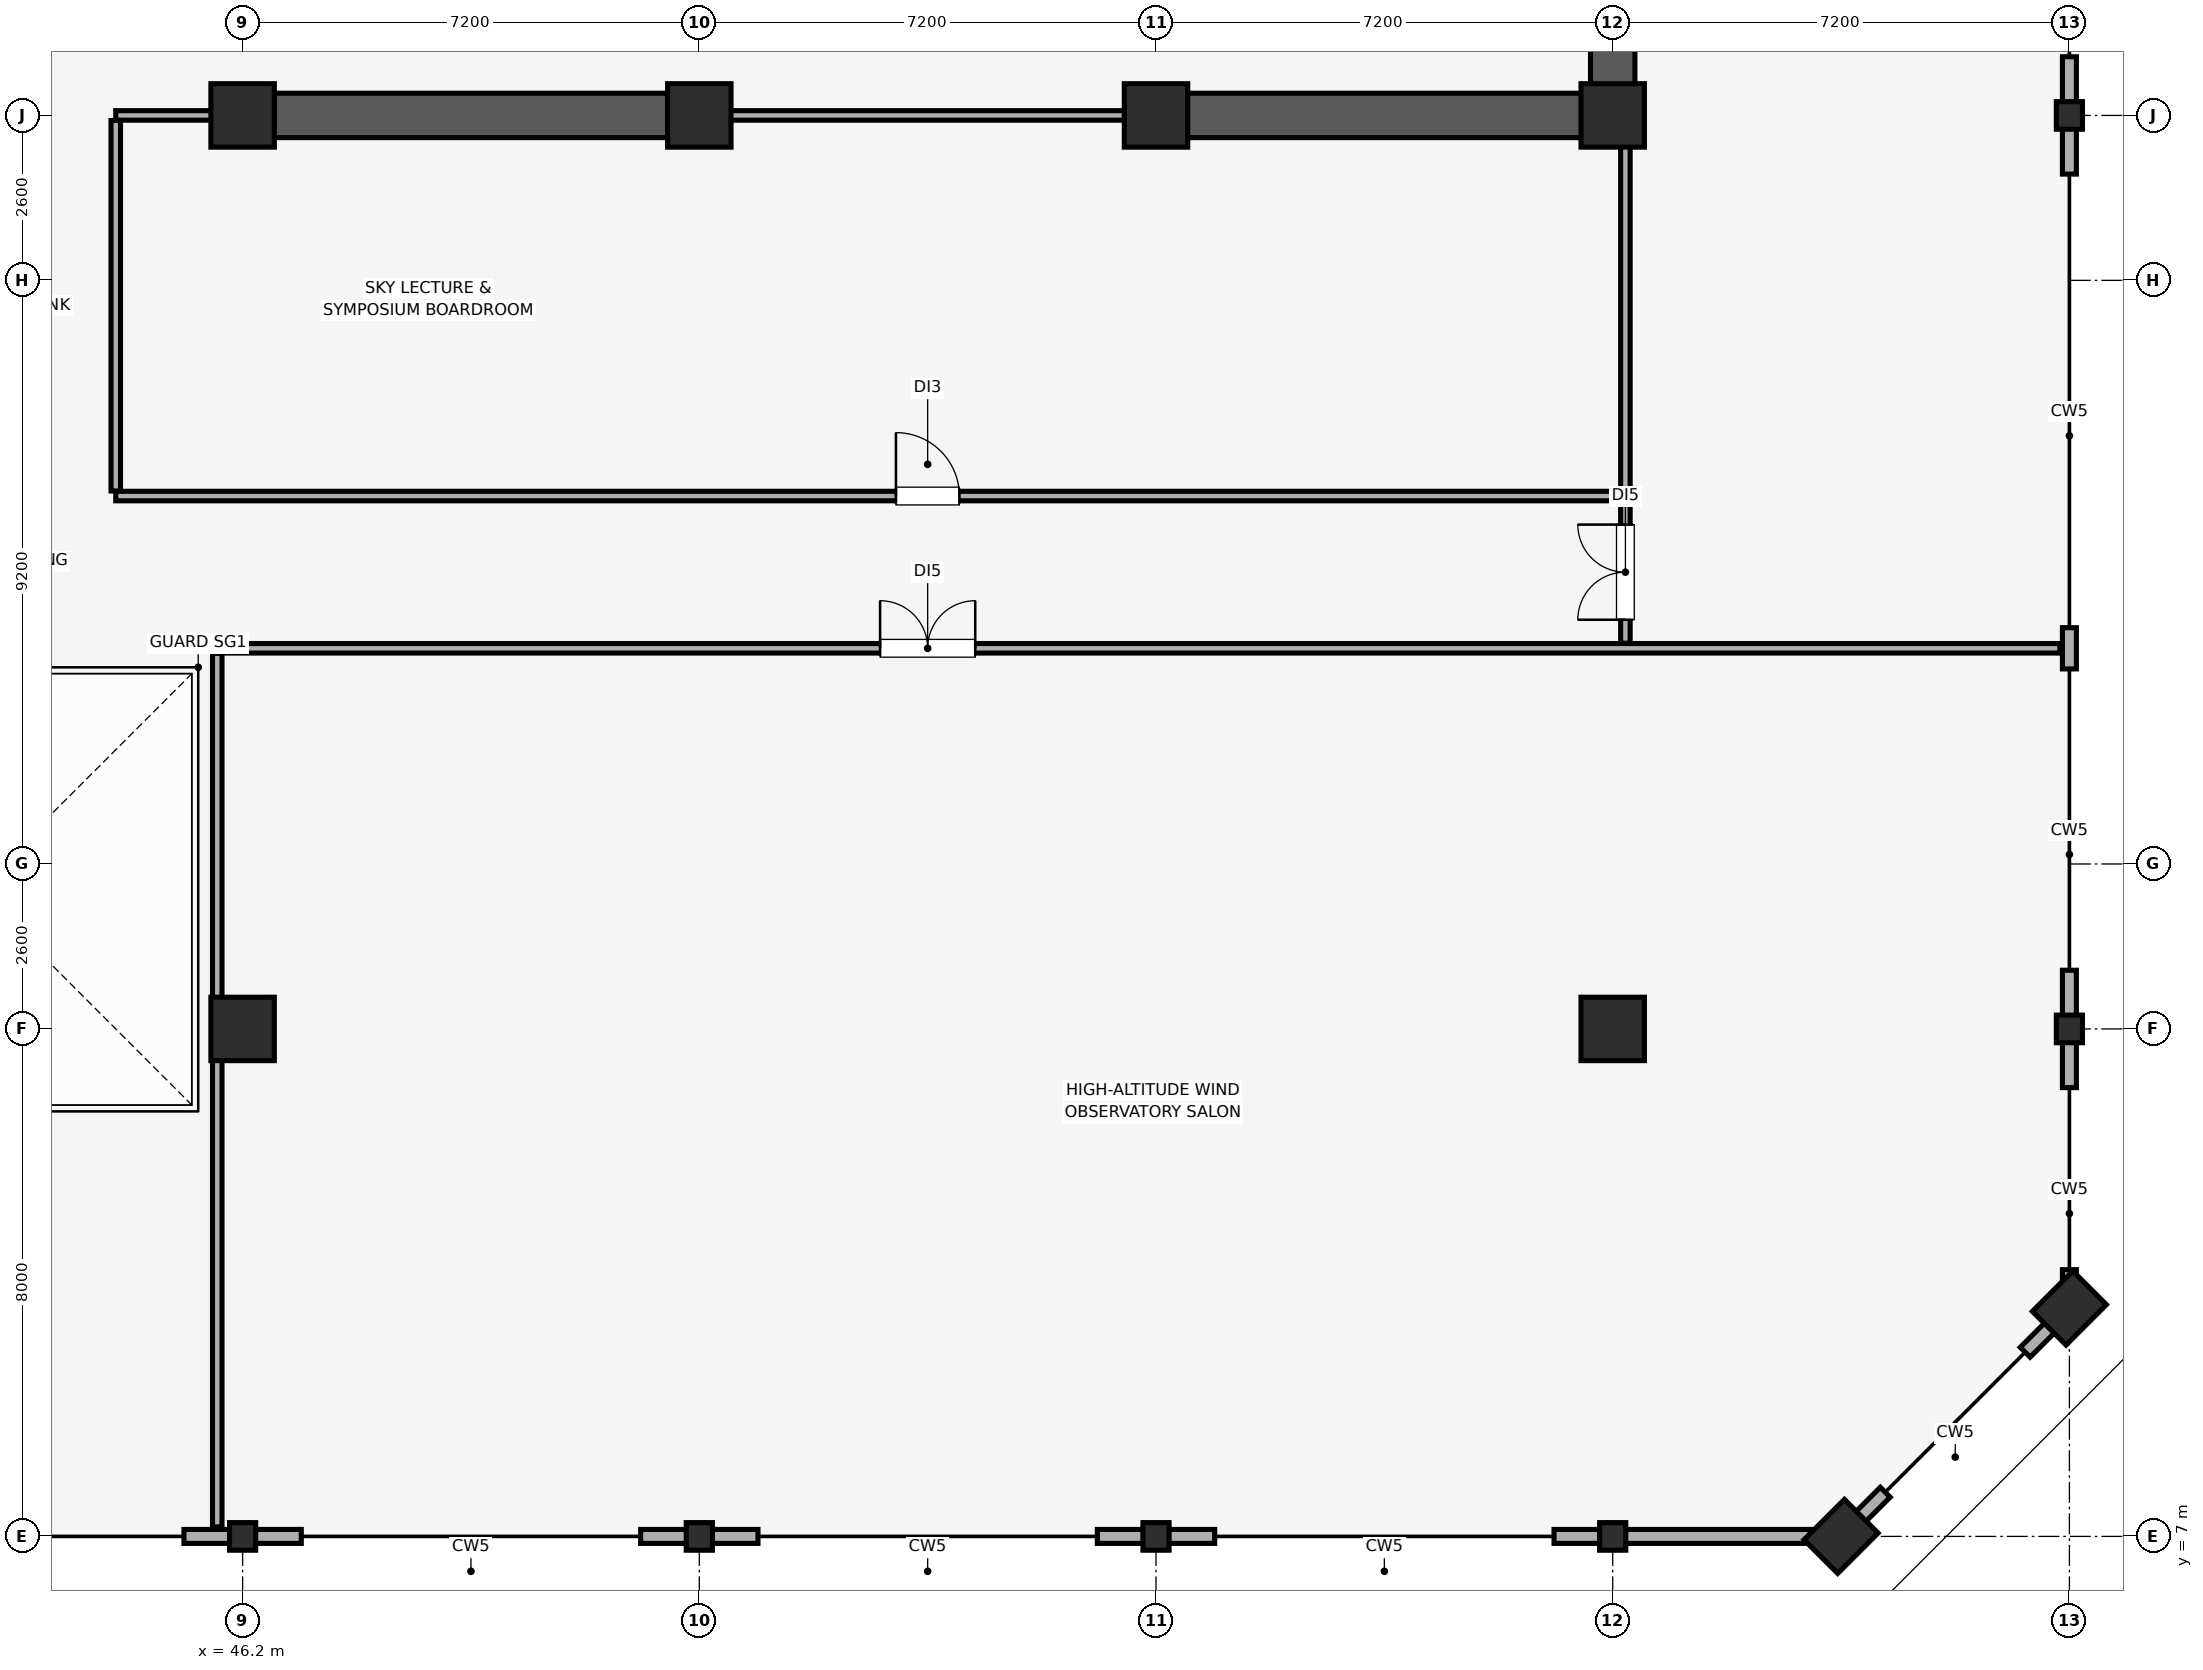
"""IFC4 building model, lengths in metres.
Left out: names, types, materials, properties, quantities, classifications, styles, units other than length and angle.
Written with IfcOpenShell. Run it as: python <this file> out.ifc"""

import sys

from ifc_helpers import new_model, si_unit, direction, frame, frame_2d, origin, origin_2d, place, context, subcontext, project, spatial, rectangle, i_section, extrude, element, fill, save


model = new_model("IFC4")
c1 = context("Model", 3, precision=1e-05, world=origin(), true_north=direction((0.0, 1.0)))
c2 = subcontext(c1, "Body", "Model", "MODEL_VIEW")
j1 = project(units=[si_unit("LENGTHUNIT", "METRE"), si_unit("PLANEANGLEUNIT", "RADIAN")], contexts=[c1])
p1 = place(None, origin())
s1 = spatial("IfcSite", under=j1, at=p1, CompositionType="ELEMENT")
p2 = place(p1, origin())
s2 = spatial("IfcBuilding", under=s1, at=p2, CompositionType="ELEMENT")
p3 = place(p2, frame((0.0, 0.0, 300.2)))
s3 = spatial("IfcBuildingStorey", under=s2, at=p3, CompositionType="ELEMENT", Elevation=300.2)
for number, where, z_axis, x_axis in (
    (1, (46.2, 7.0, 0.0), (0.0, 0.0, 1.0), (1.0, 0.0, 0.0)),
    (2, (53.4, 7.0, 0.0), (0.0, 0.0, 1.0), (1.0, 0.0, 0.0)),
    (3, (60.6, 7.0, 0.0), (0.0, 0.0, 1.0), (1.0, 0.0, 0.0)),
    (4, (67.8, 7.0, 0.0), (0.0, 0.0, 1.0), (1.0, 0.0, 0.0)),
    (5, (75.0, 15.0, 0.0), (0.0, 0.0, 1.0), (1.0, 0.0, 0.0)),
    (6, (75.0, 29.4, 0.0), (0.0, 0.0, 1.0), (1.0, 0.0, 0.0)),
):
    element("IfcColumn", number, at=place(p3, frame(where, z_axis=z_axis, x_axis=x_axis)), inside=s3, PredefinedType="COLUMN", context=c2, shape_type="SweptSolid", body=[
        extrude(i_section(OverallWidth=0.412, OverallDepth=0.435, WebThickness=0.036, FlangeThickness=0.056, FilletRadius=0.015, at=origin_2d()), origin(), (0.0, 0.0, 1.0), 5.12),
    ])
for number, where, z_axis, x_axis in (
    (7, (71.4, 7.0, 0.0), (0.0, 0.0, 1.0), (0.707, 0.707, 0.0)),
    (8, (75.0, 10.6, 0.0), (0.0, 0.0, 1.0), (0.707, 0.707, 0.0)),
):
    element("IfcColumn", number, at=place(p3, frame(where, z_axis=z_axis, x_axis=x_axis)), inside=s3, PredefinedType="PILASTER", context=c2, shape_type="SweptSolid", body=[
        extrude(rectangle(XDim=0.9, YDim=0.75, at=origin_2d()), origin(), (0.0, 0.0, 1.0), 5.12),
    ])
for number, where, z_axis, x_axis in (
    (9, (46.2, 15.0, 0.0), (0.0, 0.0, 1.0), (1.0, 0.0, 0.0)),
    (10, (67.8, 15.0, 0.0), (0.0, 0.0, 1.0), (1.0, 0.0, 0.0)),
    (11, (46.2, 29.4, 0.0), (0.0, 0.0, 1.0), (1.0, 0.0, 0.0)),
    (12, (53.4, 29.4, 0.0), (0.0, 0.0, 1.0), (1.0, 0.0, 0.0)),
    (13, (60.6, 29.4, 0.0), (0.0, 0.0, 1.0), (1.0, 0.0, 0.0)),
    (14, (67.8, 29.4, 0.0), (0.0, 0.0, 1.0), (1.0, 0.0, 0.0)),
):
    element("IfcColumn", number, at=place(p3, frame(where, z_axis=z_axis, x_axis=x_axis)), inside=s3, PredefinedType="COLUMN", context=c2, shape_type="SweptSolid", body=[
        extrude(rectangle(XDim=1.0, YDim=1.0, at=origin_2d()), origin(), (0.0, 0.0, 1.0), 5.12),
    ])
p4 = place(p3, frame((45.275, 7.0, 0.0), z_axis=(0.0, 0.0, 1.0), x_axis=(1.0, 0.0, 0.0)))
e15 = element("IfcWall", 15, at=p4, inside=s3, PredefinedType="SOLIDWALL", context=c2, shape_type="SweptSolid", body=[
    extrude(rectangle(XDim=1.85, YDim=0.22, at=frame_2d((0.925, 0.0))), origin(), (0.0, 0.0, 1.0), 4.32),
])
for number, where, z_axis, x_axis in (
    (16, (52.475, 7.0, 0.0), (0.0, 0.0, 1.0), (1.0, 0.0, 0.0)),
    (17, (59.675, 7.0, 0.0), (0.0, 0.0, 1.0), (1.0, 0.0, 0.0)),
):
    element("IfcWall", number, at=place(p3, frame(where, z_axis=z_axis, x_axis=x_axis)), inside=s3, PredefinedType="SOLIDWALL", context=c2, shape_type="SweptSolid", body=[
        extrude(rectangle(XDim=1.85, YDim=0.22, at=frame_2d((0.925, 0.0))), origin(), (0.0, 0.0, 1.0), 4.32),
    ])
p5 = place(p3, frame((66.875, 7.0, 0.0), z_axis=(0.0, 0.0, 1.0), x_axis=(1.0, 0.0, 0.0)))
e18 = element("IfcWall", 18, at=p5, inside=s3, PredefinedType="SOLIDWALL", context=c2, shape_type="SweptSolid", body=[
    extrude(rectangle(XDim=4.525, YDim=0.22, at=frame_2d((2.262, 0.0))), origin(), (0.0, 0.0, 1.0), 4.32),
])
for number, where, z_axis, x_axis in (
    (19, (71.4, 7.0, 0.0), (0.0, 0.0, 1.0), (0.707, 0.707, 0.0)),
    (20, (74.303, 9.904, 0.0), (0.0, 0.0, 1.0), (0.707, 0.707, 0.0)),
):
    element("IfcWall", number, at=place(p3, frame(where, z_axis=z_axis, x_axis=x_axis)), inside=s3, PredefinedType="SOLIDWALL", context=c2, shape_type="SweptSolid", body=[
        extrude(rectangle(XDim=0.985, YDim=0.22, at=frame_2d((0.493, 0.0))), origin(), (0.0, 0.0, 1.0), 4.32),
    ])
p6 = place(p3, frame((75.0, 10.6, 0.0), z_axis=(0.0, 0.0, 1.0), x_axis=(0.0, 1.0, 0.0)))
e21 = element("IfcWall", 21, at=p6, inside=s3, PredefinedType="SOLIDWALL", context=c2, shape_type="SweptSolid", body=[
    extrude(rectangle(XDim=0.605, YDim=0.22, at=frame_2d((0.302, 0.0))), origin(), (0.0, 0.0, 1.0), 5.12),
])
p7 = place(p3, frame((75.0, 14.075, 0.0), z_axis=(0.0, 0.0, 1.0), x_axis=(0.0, 1.0, 0.0)))
e22 = element("IfcWall", 22, at=p7, inside=s3, PredefinedType="SOLIDWALL", context=c2, shape_type="SweptSolid", body=[
    extrude(rectangle(XDim=1.85, YDim=0.22, at=frame_2d((0.925, 0.0))), origin(), (0.0, 0.0, 1.0), 4.32),
])
p8 = place(p3, frame((75.0, 20.675, 0.0), z_axis=(0.0, 0.0, 1.0), x_axis=(0.0, 1.0, 0.0)))
e23 = element("IfcWall", 23, at=p8, inside=s3, PredefinedType="SOLIDWALL", context=c2, shape_type="SweptSolid", body=[
    extrude(rectangle(XDim=0.65, YDim=0.22, at=frame_2d((0.325, 0.0))), origin(), (0.0, 0.0, 1.0), 4.32),
])
p9 = place(p3, frame((75.0, 28.475, 0.0), z_axis=(0.0, 0.0, 1.0), x_axis=(0.0, 1.0, 0.0)))
e24 = element("IfcWall", 24, at=p9, inside=s3, PredefinedType="SOLIDWALL", context=c2, shape_type="SweptSolid", body=[
    extrude(rectangle(XDim=1.85, YDim=0.22, at=frame_2d((0.925, 0.0))), origin(), (0.0, 0.0, 1.0), 4.32),
])
p10 = place(p3, frame((67.8, 29.4, 0.0), z_axis=(0.0, 0.0, 1.0), x_axis=(0.0, 1.0, 0.0)))
e25 = element("IfcWall", 25, at=p10, inside=s3, PredefinedType="SHEAR", context=c2, shape_type="SweptSolid", body=[
    extrude(rectangle(XDim=19.2, YDim=0.7, at=frame_2d((9.6, 0.0))), origin(), (0.0, 0.0, 1.0), 5.12),
])
p11 = place(p3, frame((46.0, 29.4, 0.0), z_axis=(0.0, 0.0, 1.0), x_axis=(1.0, 0.0, 0.0)))
e26 = element("IfcWall", 26, at=p11, inside=s3, PredefinedType="SHEAR", context=c2, shape_type="SweptSolid", body=[
    extrude(rectangle(XDim=7.6, YDim=0.7, at=frame_2d((3.8, 0.0))), origin(), (0.0, 0.0, 1.0), 5.12),
])
p12 = place(p3, frame((60.4, 29.4, 0.0), z_axis=(0.0, 0.0, 1.0), x_axis=(1.0, 0.0, 0.0)))
e27 = element("IfcWall", 27, at=p12, inside=s3, PredefinedType="SHEAR", context=c2, shape_type="SweptSolid", body=[
    extrude(rectangle(XDim=7.045, YDim=0.7, at=frame_2d((3.522, 0.0))), origin(), (0.0, 0.0, 1.0), 5.12),
])
p13 = place(p3, frame((45.8, 21.0, 0.0), z_axis=(0.0, 0.0, 1.0), x_axis=(1.0, 0.0, 0.0)))
e28 = element("IfcWall", 28, at=p13, inside=s3, PredefinedType="PARTITIONING", context=c2, shape_type="SweptSolid", body=[
    extrude(rectangle(XDim=29.05, YDim=0.15, at=frame_2d((14.525, 0.0))), origin(), (0.0, 0.0, 1.0), 5.12),
])
p14 = place(p13, frame((10.45, 0.0, 0.0)))
e29 = element("IfcOpeningElement", 29, at=p14, cuts=e28, PredefinedType="OPENING", context=c2, shape_type="SweptSolid", body=[
    extrude(rectangle(XDim=1.5, YDim=2.25, at=frame_2d((0.75, 1.125))), frame((0.0, 0.085, 0.0), z_axis=(0.0, -1.0, 0.0), x_axis=(1.0, 0.0, 0.0)), (0.0, 0.0, 1.0), 0.17),
])
p15 = place(p3, frame((45.8, 7.15, 0.0), z_axis=(0.0, 0.0, 1.0), x_axis=(0.0, 1.0, 0.0)))
e30 = element("IfcWall", 30, at=p15, inside=s3, PredefinedType="PARTITIONING", context=c2, shape_type="SweptSolid", body=[
    extrude(rectangle(XDim=13.77, YDim=0.15, at=frame_2d((6.885, 0.0))), origin(), (0.0, 0.0, 1.0), 5.12),
])
p16 = place(p3, frame((44.2, 23.4, 0.0), z_axis=(0.0, 0.0, 1.0), x_axis=(1.0, 0.0, 0.0)))
e31 = element("IfcWall", 31, at=p16, inside=s3, PredefinedType="PARTITIONING", context=c2, shape_type="SweptSolid", body=[
    extrude(rectangle(XDim=23.8, YDim=0.15, at=frame_2d((11.9, 0.0))), origin(), (0.0, 0.0, 1.0), 5.12),
])
p17 = place(p16, frame((12.3, 0.0, 0.0)))
e32 = element("IfcOpeningElement", 32, at=p17, cuts=e31, PredefinedType="OPENING", context=c2, shape_type="SweptSolid", body=[
    extrude(rectangle(XDim=1.0, YDim=2.15, at=frame_2d((0.5, 1.075))), frame((0.0, 0.085, 0.0), z_axis=(0.0, -1.0, 0.0), x_axis=(1.0, 0.0, 0.0)), (0.0, 0.0, 1.0), 0.17),
])
p18 = place(p3, frame((44.2, 29.4, 0.0), z_axis=(0.0, 0.0, 1.0), x_axis=(1.0, 0.0, 0.0)))
e33 = element("IfcWall", 33, at=p18, inside=s3, PredefinedType="PARTITIONING", context=c2, shape_type="SweptSolid", body=[
    extrude(rectangle(XDim=1.79, YDim=0.15, at=frame_2d((0.895, 0.0))), origin(), (0.0, 0.0, 1.0), 4.02),
])
p19 = place(p3, frame((53.61, 29.4, 0.0), z_axis=(0.0, 0.0, 1.0), x_axis=(1.0, 0.0, 0.0)))
e34 = element("IfcWall", 34, at=p19, inside=s3, PredefinedType="PARTITIONING", context=c2, shape_type="SweptSolid", body=[
    extrude(rectangle(XDim=6.78, YDim=0.15, at=frame_2d((3.39, 0.0))), origin(), (0.0, 0.0, 1.0), 4.02),
])
p20 = place(p3, frame((44.2, 23.48, 0.0), z_axis=(0.0, 0.0, 1.0), x_axis=(0.0, 1.0, 0.0)))
e35 = element("IfcWall", 35, at=p20, inside=s3, PredefinedType="PARTITIONING", context=c2, shape_type="SweptSolid", body=[
    extrude(rectangle(XDim=5.84, YDim=0.15, at=frame_2d((2.92, 0.0))), origin(), (0.0, 0.0, 1.0), 5.12),
])
p21 = place(p3, frame((68.0, 23.48, 0.0), z_axis=(0.0, 0.0, 1.0), x_axis=(0.0, 1.0, 0.0)))
e36 = element("IfcWall", 36, at=p21, inside=s3, PredefinedType="PARTITIONING", context=c2, shape_type="SweptSolid", body=[
    extrude(rectangle(XDim=5.91, YDim=0.15, at=frame_2d((2.955, 0.0))), origin(), (0.0, 0.0, 1.0), 4.76),
])
p22 = place(p3, frame((68.0, 21.08, 0.0), z_axis=(0.0, 0.0, 1.0), x_axis=(0.0, 1.0, 0.0)))
e37 = element("IfcWall", 37, at=p22, inside=s3, PredefinedType="PARTITIONING", context=c2, shape_type="SweptSolid", body=[
    extrude(rectangle(XDim=2.24, YDim=0.15, at=frame_2d((1.12, 0.0))), origin(), (0.0, 0.0, 1.0), 4.76),
])
p23 = place(p22, frame((0.37, 0.0, 0.0)))
e38 = element("IfcOpeningElement", 38, at=p23, cuts=e37, PredefinedType="OPENING", context=c2, shape_type="SweptSolid", body=[
    extrude(rectangle(XDim=1.5, YDim=2.25, at=frame_2d((0.75, 1.125))), frame((0.0, 0.085, 0.0), z_axis=(0.0, -1.0, 0.0), x_axis=(1.0, 0.0, 0.0)), (0.0, 0.0, 1.0), 0.17),
])
p24 = place(p14, origin())
e39 = element("IfcDoor", 39, at=p24, inside=s3, OperationType="DOUBLE_DOOR_SINGLE_SWING", PredefinedType="DOOR", context=c2, shape_type="SweptSolid", body=[
    extrude(rectangle(XDim=1.5, YDim=2.25, at=frame_2d((0.75, 1.125))), frame((0.0, 0.025, 0.0), z_axis=(0.0, -1.0, 0.0), x_axis=(1.0, 0.0, 0.0)), (0.0, 0.0, 1.0), 0.05),
])
fill(e29, e39)
p25 = place(p17, origin())
e40 = element("IfcDoor", 40, at=p25, inside=s3, OperationType="SINGLE_SWING_LEFT", PredefinedType="DOOR", context=c2, shape_type="SweptSolid", body=[
    extrude(rectangle(XDim=1.0, YDim=2.15, at=frame_2d((0.5, 1.075))), frame((0.0, 0.025, 0.0), z_axis=(0.0, -1.0, 0.0), x_axis=(1.0, 0.0, 0.0)), (0.0, 0.0, 1.0), 0.05),
])
fill(e32, e40)
p26 = place(p23, origin())
e41 = element("IfcDoor", 41, at=p26, inside=s3, OperationType="DOUBLE_DOOR_SINGLE_SWING", PredefinedType="DOOR", context=c2, shape_type="SweptSolid", body=[
    extrude(rectangle(XDim=1.5, YDim=2.25, at=frame_2d((0.75, 1.125))), frame((0.0, 0.025, 0.0), z_axis=(0.0, -1.0, 0.0), x_axis=(1.0, 0.0, 0.0)), (0.0, 0.0, 1.0), 0.05),
])
fill(e38, e41)
save(model, sys.argv[1])
